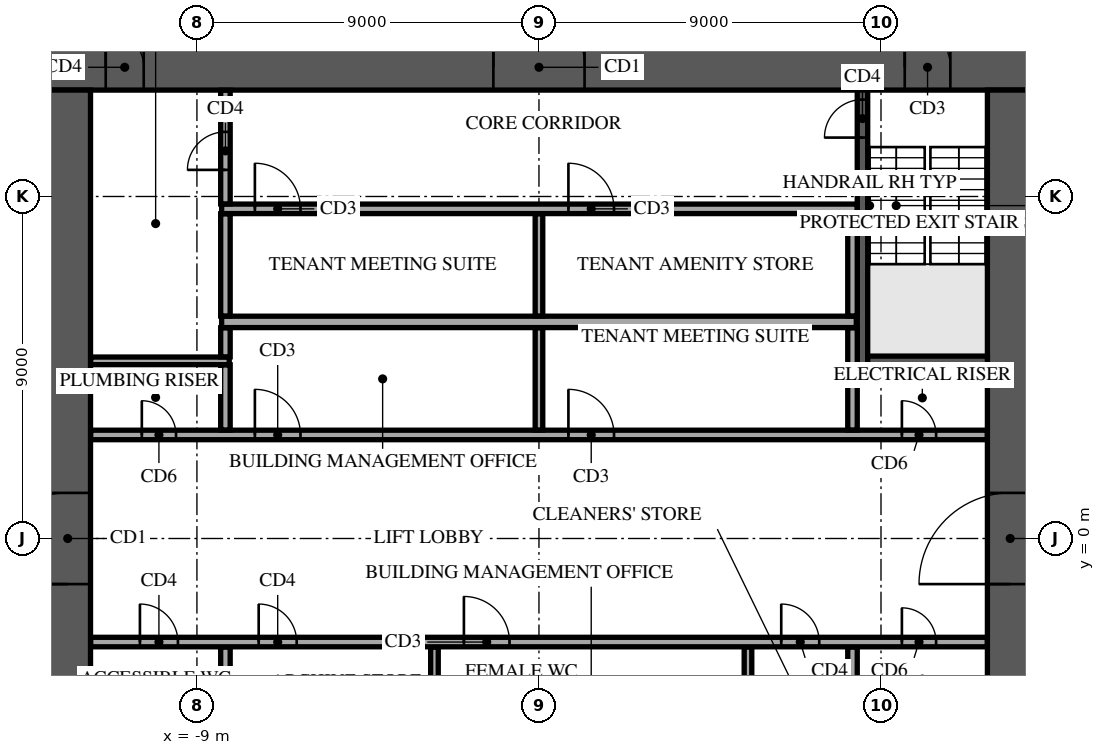
"""IFC4 building model, lengths in metres.
Left out: names, types, materials, properties, quantities, classifications, styles, units other than length and angle.
Written with IfcOpenShell. Run it as: python <this file> out.ifc"""

import sys

from ifc_helpers import new_model, si_unit, direction, frame, frame_2d, origin, place, context, subcontext, project, spatial, rectangle, extrude, element, fill, save


model = new_model("IFC4")
c1 = context("Model", 3, precision=1e-05, world=origin(), true_north=direction((0.0, 1.0)))
c2 = subcontext(c1, "Body", "Model", "MODEL_VIEW")
j1 = project(units=[si_unit("LENGTHUNIT", "METRE"), si_unit("PLANEANGLEUNIT", "RADIAN")], contexts=[c1])
p1 = place(None, origin())
s1 = spatial("IfcSite", under=j1, at=p1, CompositionType="ELEMENT")
p2 = place(p1, origin())
s2 = spatial("IfcBuilding", under=s1, at=p2, CompositionType="ELEMENT")
p3 = place(p2, frame((0.0, 0.0, -9.0)))
s3 = spatial("IfcBuildingStorey", under=s2, at=p3, CompositionType="ELEMENT", Elevation=-9.0)
p4 = place(p3, frame((-13.0, 12.4, 0.0), z_axis=(0.0, 0.0, 1.0), x_axis=(1.0, 0.0, 0.0)))
e1 = element("IfcWall", 1, at=p4, inside=s3, PredefinedType="SHEAR", context=c2, shape_type="SweptSolid", body=[
    extrude(rectangle(XDim=26.0, YDim=1.2, at=frame_2d((13.0, 0.0))), origin(), (0.0, 0.0, 1.0), 4.2),
])
p5 = place(p4, frame((11.8, 0.0, 0.0)))
e2 = element("IfcOpeningElement", 2, at=p5, cuts=e1, PredefinedType="OPENING", context=c2, shape_type="SweptSolid", body=[
    extrude(rectangle(XDim=2.4, YDim=2.4, at=frame_2d((1.2, 1.2))), frame((0.0, 0.61, 0.0), z_axis=(0.0, -1.0, 0.0), x_axis=(1.0, 0.0, 0.0)), (0.0, 0.0, 1.0), 1.22),
])
p6 = place(p4, frame((22.625, 0.0, 0.0)))
e3 = element("IfcOpeningElement", 3, at=p6, cuts=e1, PredefinedType="OPENING", context=c2, shape_type="SweptSolid", body=[
    extrude(rectangle(XDim=1.2, YDim=2.1, at=frame_2d((0.6, 1.05))), frame((0.0, 0.61, 0.0), z_axis=(0.0, -1.0, 0.0), x_axis=(1.0, 0.0, 0.0)), (0.0, 0.0, 1.0), 1.22),
])
p7 = place(p4, frame((1.6, 0.0, 0.0)))
e4 = element("IfcOpeningElement", 4, at=p7, cuts=e1, PredefinedType="OPENING", context=c2, shape_type="SweptSolid", body=[
    extrude(rectangle(XDim=1.0, YDim=2.1, at=frame_2d((0.5, 1.05))), frame((0.0, 0.61, 0.0), z_axis=(0.0, -1.0, 0.0), x_axis=(1.0, 0.0, 0.0)), (0.0, 0.0, 1.0), 1.22),
])
p8 = place(p3, frame((12.4, -11.8, 0.0), z_axis=(0.0, 0.0, 1.0), x_axis=(0.0, 1.0, 0.0)))
e5 = element("IfcWall", 5, at=p8, inside=s3, PredefinedType="SHEAR", context=c2, shape_type="SweptSolid", body=[
    extrude(rectangle(XDim=23.6, YDim=1.2, at=frame_2d((11.8, 0.0))), origin(), (0.0, 0.0, 1.0), 4.2),
])
p9 = place(p8, frame((10.6, 0.0, 0.0)))
e6 = element("IfcOpeningElement", 6, at=p9, cuts=e5, PredefinedType="OPENING", context=c2, shape_type="SweptSolid", body=[
    extrude(rectangle(XDim=2.4, YDim=2.4, at=frame_2d((1.2, 1.2))), frame((0.0, 0.61, 0.0), z_axis=(0.0, -1.0, 0.0), x_axis=(1.0, 0.0, 0.0)), (0.0, 0.0, 1.0), 1.22),
])
p10 = place(p3, frame((-12.4, -11.8, 0.0), z_axis=(0.0, 0.0, 1.0), x_axis=(0.0, 1.0, 0.0)))
e7 = element("IfcWall", 7, at=p10, inside=s3, PredefinedType="SHEAR", context=c2, shape_type="SweptSolid", body=[
    extrude(rectangle(XDim=23.6, YDim=1.2, at=frame_2d((11.8, 0.0))), origin(), (0.0, 0.0, 1.0), 4.2),
])
p11 = place(p10, frame((10.6, 0.0, 0.0)))
e8 = element("IfcOpeningElement", 8, at=p11, cuts=e7, PredefinedType="OPENING", context=c2, shape_type="SweptSolid", body=[
    extrude(rectangle(XDim=2.4, YDim=2.4, at=frame_2d((1.2, 1.2))), frame((0.0, 0.61, 0.0), z_axis=(0.0, -1.0, 0.0), x_axis=(1.0, 0.0, 0.0)), (0.0, 0.0, 1.0), 1.22),
])
p12 = place(p3, frame((8.512, 4.55, 0.0), z_axis=(0.0, 0.0, 1.0), x_axis=(0.0, 1.0, 0.0)))
e9 = element("IfcWall", 9, at=p12, inside=s3, PredefinedType="SOLIDWALL", context=c2, shape_type="SweptSolid", body=[
    extrude(rectangle(XDim=7.25, YDim=0.275, at=frame_2d((3.625, 0.0))), origin(), (0.0, 0.0, 1.0), 4.2),
])
p13 = place(p12, frame((6.0, 0.0, 0.0)))
e10 = element("IfcOpeningElement", 10, at=p13, cuts=e9, PredefinedType="OPENING", context=c2, shape_type="SweptSolid", body=[
    extrude(rectangle(XDim=1.0, YDim=2.1, at=frame_2d((0.5, 1.05))), frame((0.0, 0.147, 0.0), z_axis=(0.0, -1.0, 0.0), x_axis=(1.0, 0.0, 0.0)), (0.0, 0.0, 1.0), 0.295),
])
p14 = place(p3, frame((8.65, 4.675, 0.0), z_axis=(0.0, 0.0, 1.0), x_axis=(1.0, 0.0, 0.0)))
e11 = element("IfcWall", 11, at=p14, inside=s3, PredefinedType="SOLIDWALL", context=c2, shape_type="SweptSolid", body=[
    extrude(rectangle(XDim=3.15, YDim=0.25, at=frame_2d((1.575, 0.0))), origin(), (0.0, 0.0, 1.0), 4.2),
])
p15 = place(p3, frame((-8.25, -5.545, 0.0), z_axis=(0.0, 0.0, 1.0), x_axis=(0.0, 1.0, 0.0)))
e12 = element("IfcWall", 12, at=p15, inside=s3, PredefinedType="PARTITIONING", context=c2, shape_type="SweptSolid", body=[
    extrude(rectangle(XDim=2.69, YDim=0.25, at=frame_2d((1.345, 0.0))), origin(), (0.0, 0.0, 1.0), 4.2),
])
for number, where, z_axis, x_axis in (
    (13, (-2.75, -5.545, 0.0), (0.0, 0.0, 1.0), (0.0, 1.0, 0.0)),
    (14, (5.5, -5.545, 0.0), (0.0, 0.0, 1.0), (0.0, 1.0, 0.0)),
):
    element("IfcWall", number, at=place(p3, frame(where, z_axis=z_axis, x_axis=x_axis)), inside=s3, PredefinedType="PARTITIONING", context=c2, shape_type="SweptSolid", body=[
        extrude(rectangle(XDim=2.69, YDim=0.2, at=frame_2d((1.345, 0.0))), origin(), (0.0, 0.0, 1.0), 4.2),
    ])
p16 = place(p3, frame((8.25, -5.545, 0.0), z_axis=(0.0, 0.0, 1.0), x_axis=(0.0, 1.0, 0.0)))
e15 = element("IfcWall", 15, at=p16, inside=s3, PredefinedType="PARTITIONING", context=c2, shape_type="SweptSolid", body=[
    extrude(rectangle(XDim=2.69, YDim=0.25, at=frame_2d((1.345, 0.0))), origin(), (0.0, 0.0, 1.0), 4.2),
])
p17 = place(p3, frame((-11.795, -2.725, 0.0), z_axis=(0.0, 0.0, 1.0), x_axis=(1.0, 0.0, 0.0)))
e16 = element("IfcWall", 16, at=p17, inside=s3, PredefinedType="PARTITIONING", context=c2, shape_type="SweptSolid", body=[
    extrude(rectangle(XDim=23.59, YDim=0.25, at=frame_2d((11.795, 0.0))), origin(), (0.0, 0.0, 1.0), 4.2),
])
p18 = place(p17, frame((1.295, 0.0, 0.0)))
e17 = element("IfcOpeningElement", 17, at=p18, cuts=e16, PredefinedType="OPENING", context=c2, shape_type="SweptSolid", body=[
    extrude(rectangle(XDim=1.0, YDim=2.1, at=frame_2d((0.5, 1.05))), frame((0.0, 0.135, 0.0), z_axis=(0.0, -1.0, 0.0), x_axis=(1.0, 0.0, 0.0)), (0.0, 0.0, 1.0), 0.27),
])
p19 = place(p17, frame((18.17, 0.0, 0.0)))
e18 = element("IfcOpeningElement", 18, at=p19, cuts=e16, PredefinedType="OPENING", context=c2, shape_type="SweptSolid", body=[
    extrude(rectangle(XDim=1.0, YDim=2.1, at=frame_2d((0.5, 1.05))), frame((0.0, 0.135, 0.0), z_axis=(0.0, -1.0, 0.0), x_axis=(1.0, 0.0, 0.0)), (0.0, 0.0, 1.0), 0.27),
])
p20 = place(p17, frame((21.345, 0.0, 0.0)))
e19 = element("IfcOpeningElement", 19, at=p20, cuts=e16, PredefinedType="OPENING", context=c2, shape_type="SweptSolid", body=[
    extrude(rectangle(XDim=0.9, YDim=2.1, at=frame_2d((0.45, 1.05))), frame((0.0, 0.135, 0.0), z_axis=(0.0, -1.0, 0.0), x_axis=(1.0, 0.0, 0.0)), (0.0, 0.0, 1.0), 0.27),
])
p21 = place(p17, frame((4.42, 0.0, 0.0)))
e20 = element("IfcOpeningElement", 20, at=p21, cuts=e16, PredefinedType="OPENING", context=c2, shape_type="SweptSolid", body=[
    extrude(rectangle(XDim=1.0, YDim=2.1, at=frame_2d((0.5, 1.05))), frame((0.0, 0.135, 0.0), z_axis=(0.0, -1.0, 0.0), x_axis=(1.0, 0.0, 0.0)), (0.0, 0.0, 1.0), 0.27),
])
p22 = place(p17, frame((9.82, 0.0, 0.0)))
e21 = element("IfcOpeningElement", 21, at=p22, cuts=e16, PredefinedType="OPENING", context=c2, shape_type="SweptSolid", body=[
    extrude(rectangle(XDim=1.2, YDim=2.1, at=frame_2d((0.6, 1.05))), frame((0.0, 0.135, 0.0), z_axis=(0.0, -1.0, 0.0), x_axis=(1.0, 0.0, 0.0)), (0.0, 0.0, 1.0), 0.27),
])
p23 = place(p3, frame((-11.795, 2.725, 0.0), z_axis=(0.0, 0.0, 1.0), x_axis=(1.0, 0.0, 0.0)))
e22 = element("IfcWall", 22, at=p23, inside=s3, PredefinedType="PARTITIONING", context=c2, shape_type="SweptSolid", body=[
    extrude(rectangle(XDim=23.59, YDim=0.25, at=frame_2d((11.795, 0.0))), origin(), (0.0, 0.0, 1.0), 4.2),
])
p24 = place(p23, frame((21.345, 0.0, 0.0)))
e23 = element("IfcOpeningElement", 23, at=p24, cuts=e22, PredefinedType="OPENING", context=c2, shape_type="SweptSolid", body=[
    extrude(rectangle(XDim=0.9, YDim=2.1, at=frame_2d((0.45, 1.05))), frame((0.0, 0.135, 0.0), z_axis=(0.0, -1.0, 0.0), x_axis=(1.0, 0.0, 0.0)), (0.0, 0.0, 1.0), 0.27),
])
p25 = place(p23, frame((1.345, 0.0, 0.0)))
e24 = element("IfcOpeningElement", 24, at=p25, cuts=e22, PredefinedType="OPENING", context=c2, shape_type="SweptSolid", body=[
    extrude(rectangle(XDim=0.9, YDim=2.1, at=frame_2d((0.45, 1.05))), frame((0.0, 0.135, 0.0), z_axis=(0.0, -1.0, 0.0), x_axis=(1.0, 0.0, 0.0)), (0.0, 0.0, 1.0), 0.27),
])
p26 = place(p23, frame((4.32, 0.0, 0.0)))
e25 = element("IfcOpeningElement", 25, at=p26, cuts=e22, PredefinedType="OPENING", context=c2, shape_type="SweptSolid", body=[
    extrude(rectangle(XDim=1.2, YDim=2.1, at=frame_2d((0.6, 1.05))), frame((0.0, 0.135, 0.0), z_axis=(0.0, -1.0, 0.0), x_axis=(1.0, 0.0, 0.0)), (0.0, 0.0, 1.0), 0.27),
])
p27 = place(p23, frame((12.57, 0.0, 0.0)))
e26 = element("IfcOpeningElement", 26, at=p27, cuts=e22, PredefinedType="OPENING", context=c2, shape_type="SweptSolid", body=[
    extrude(rectangle(XDim=1.2, YDim=2.1, at=frame_2d((0.6, 1.05))), frame((0.0, 0.135, 0.0), z_axis=(0.0, -1.0, 0.0), x_axis=(1.0, 0.0, 0.0)), (0.0, 0.0, 1.0), 0.27),
])
p28 = place(p3, frame((-8.25, 2.855, 0.0), z_axis=(0.0, 0.0, 1.0), x_axis=(0.0, 1.0, 0.0)))
e27 = element("IfcWall", 27, at=p28, inside=s3, PredefinedType="PARTITIONING", context=c2, shape_type="SweptSolid", body=[
    extrude(rectangle(XDim=1.715, YDim=0.25, at=frame_2d((0.857, 0.0))), origin(), (0.0, 0.0, 1.0), 4.2),
])
p29 = place(p3, frame((0.0, 2.855, 0.0), z_axis=(0.0, 0.0, 1.0), x_axis=(0.0, 1.0, 0.0)))
e28 = element("IfcWall", 28, at=p29, inside=s3, PredefinedType="PARTITIONING", context=c2, shape_type="SweptSolid", body=[
    extrude(rectangle(XDim=2.69, YDim=0.2, at=frame_2d((1.345, 0.0))), origin(), (0.0, 0.0, 1.0), 4.2),
])
p30 = place(p3, frame((8.25, 2.855, 0.0), z_axis=(0.0, 0.0, 1.0), x_axis=(0.0, 1.0, 0.0)))
e29 = element("IfcWall", 29, at=p30, inside=s3, PredefinedType="PARTITIONING", context=c2, shape_type="SweptSolid", body=[
    extrude(rectangle(XDim=2.69, YDim=0.25, at=frame_2d((1.345, 0.0))), origin(), (0.0, 0.0, 1.0), 4.2),
])
p31 = place(p3, frame((-11.795, 4.675, 0.0), z_axis=(0.0, 0.0, 1.0), x_axis=(1.0, 0.0, 0.0)))
e30 = element("IfcWall", 30, at=p31, inside=s3, PredefinedType="PARTITIONING", context=c2, shape_type="SweptSolid", body=[
    extrude(rectangle(XDim=3.645, YDim=0.2, at=frame_2d((1.823, 0.0))), origin(), (0.0, 0.0, 1.0), 4.2),
])
p32 = place(p3, frame((-8.25, 4.78, 0.0), z_axis=(0.0, 0.0, 1.0), x_axis=(0.0, 1.0, 0.0)))
e31 = element("IfcWall", 31, at=p32, inside=s3, PredefinedType="PARTITIONING", context=c2, shape_type="SweptSolid", body=[
    extrude(rectangle(XDim=0.765, YDim=0.25, at=frame_2d((0.382, 0.0))), origin(), (0.0, 0.0, 1.0), 4.2),
])
p33 = place(p3, frame((-8.35, 5.7, 0.0), z_axis=(0.0, 0.0, 1.0), x_axis=(1.0, 0.0, 0.0)))
e32 = element("IfcWall", 32, at=p33, inside=s3, PredefinedType="PARTITIONING", context=c2, shape_type="SweptSolid", body=[
    extrude(rectangle(XDim=16.7, YDim=0.3, at=frame_2d((8.35, 0.0))), origin(), (0.0, 0.0, 1.0), 4.2),
])
p34 = place(p3, frame((-8.25, 5.855, 0.0), z_axis=(0.0, 0.0, 1.0), x_axis=(0.0, 1.0, 0.0)))
e33 = element("IfcWall", 33, at=p34, inside=s3, PredefinedType="PARTITIONING", context=c2, shape_type="SweptSolid", body=[
    extrude(rectangle(XDim=2.69, YDim=0.25, at=frame_2d((1.345, 0.0))), origin(), (0.0, 0.0, 1.0), 4.2),
])
p35 = place(p3, frame((0.0, 5.855, 0.0), z_axis=(0.0, 0.0, 1.0), x_axis=(0.0, 1.0, 0.0)))
e34 = element("IfcWall", 34, at=p35, inside=s3, PredefinedType="PARTITIONING", context=c2, shape_type="SweptSolid", body=[
    extrude(rectangle(XDim=2.69, YDim=0.2, at=frame_2d((1.345, 0.0))), origin(), (0.0, 0.0, 1.0), 4.2),
])
p36 = place(p3, frame((8.25, 5.855, 0.0), z_axis=(0.0, 0.0, 1.0), x_axis=(0.0, 1.0, 0.0)))
e35 = element("IfcWall", 35, at=p36, inside=s3, PredefinedType="PARTITIONING", context=c2, shape_type="SweptSolid", body=[
    extrude(rectangle(XDim=2.69, YDim=0.25, at=frame_2d((1.345, 0.0))), origin(), (0.0, 0.0, 1.0), 4.2),
])
p37 = place(p3, frame((-8.35, 8.675, 0.0), z_axis=(0.0, 0.0, 1.0), x_axis=(1.0, 0.0, 0.0)))
e36 = element("IfcWall", 36, at=p37, inside=s3, PredefinedType="PARTITIONING", context=c2, shape_type="SweptSolid", body=[
    extrude(rectangle(XDim=16.72, YDim=0.25, at=frame_2d((8.36, 0.0))), origin(), (0.0, 0.0, 1.0), 4.2),
])
p38 = place(p37, frame((0.875, 0.0, 0.0)))
e37 = element("IfcOpeningElement", 37, at=p38, cuts=e36, PredefinedType="OPENING", context=c2, shape_type="SweptSolid", body=[
    extrude(rectangle(XDim=1.2, YDim=2.1, at=frame_2d((0.6, 1.05))), frame((0.0, 0.135, 0.0), z_axis=(0.0, -1.0, 0.0), x_axis=(1.0, 0.0, 0.0)), (0.0, 0.0, 1.0), 0.27),
])
p39 = place(p37, frame((9.125, 0.0, 0.0)))
e38 = element("IfcOpeningElement", 38, at=p39, cuts=e36, PredefinedType="OPENING", context=c2, shape_type="SweptSolid", body=[
    extrude(rectangle(XDim=1.2, YDim=2.1, at=frame_2d((0.6, 1.05))), frame((0.0, 0.135, 0.0), z_axis=(0.0, -1.0, 0.0), x_axis=(1.0, 0.0, 0.0)), (0.0, 0.0, 1.0), 0.27),
])
p40 = place(p3, frame((-8.25, 8.805, 0.0), z_axis=(0.0, 0.0, 1.0), x_axis=(0.0, 1.0, 0.0)))
e39 = element("IfcWall", 39, at=p40, inside=s3, PredefinedType="PARTITIONING", context=c2, shape_type="SweptSolid", body=[
    extrude(rectangle(XDim=2.99, YDim=0.25, at=frame_2d((1.495, 0.0))), origin(), (0.0, 0.0, 1.0), 4.2),
])
p41 = place(p40, frame((0.895, 0.0, 0.0)))
e40 = element("IfcOpeningElement", 40, at=p41, cuts=e39, PredefinedType="OPENING", context=c2, shape_type="SweptSolid", body=[
    extrude(rectangle(XDim=1.0, YDim=2.1, at=frame_2d((0.5, 1.05))), frame((0.0, 0.135, 0.0), z_axis=(0.0, -1.0, 0.0), x_axis=(1.0, 0.0, 0.0)), (0.0, 0.0, 1.0), 0.27),
])
p42 = place(p5, origin())
e41 = element("IfcDoor", 41, at=p42, inside=s3, OperationType="SINGLE_SWING_LEFT", PredefinedType="DOOR", context=c2, shape_type="SweptSolid", body=[
    extrude(rectangle(XDim=2.4, YDim=2.4, at=frame_2d((1.2, 1.2))), frame((0.0, 0.025, 0.0), z_axis=(0.0, -1.0, 0.0), x_axis=(1.0, 0.0, 0.0)), (0.0, 0.0, 1.0), 0.05),
])
fill(e2, e41)
p43 = place(p6, origin())
e42 = element("IfcDoor", 42, at=p43, inside=s3, OperationType="SINGLE_SWING_LEFT", PredefinedType="DOOR", context=c2, shape_type="SweptSolid", body=[
    extrude(rectangle(XDim=1.2, YDim=2.1, at=frame_2d((0.6, 1.05))), frame((0.0, 0.025, 0.0), z_axis=(0.0, -1.0, 0.0), x_axis=(1.0, 0.0, 0.0)), (0.0, 0.0, 1.0), 0.05),
])
fill(e3, e42)
p44 = place(p7, origin())
e43 = element("IfcDoor", 43, at=p44, inside=s3, OperationType="SINGLE_SWING_LEFT", PredefinedType="DOOR", context=c2, shape_type="SweptSolid", body=[
    extrude(rectangle(XDim=1.0, YDim=2.1, at=frame_2d((0.5, 1.05))), frame((0.0, 0.025, 0.0), z_axis=(0.0, -1.0, 0.0), x_axis=(1.0, 0.0, 0.0)), (0.0, 0.0, 1.0), 0.05),
])
fill(e4, e43)
p45 = place(p9, origin())
e44 = element("IfcDoor", 44, at=p45, inside=s3, OperationType="SINGLE_SWING_LEFT", PredefinedType="DOOR", context=c2, shape_type="SweptSolid", body=[
    extrude(rectangle(XDim=2.4, YDim=2.4, at=frame_2d((1.2, 1.2))), frame((0.0, 0.025, 0.0), z_axis=(0.0, -1.0, 0.0), x_axis=(1.0, 0.0, 0.0)), (0.0, 0.0, 1.0), 0.05),
])
fill(e6, e44)
p46 = place(p11, origin())
e45 = element("IfcDoor", 45, at=p46, inside=s3, OperationType="SINGLE_SWING_LEFT", PredefinedType="DOOR", context=c2, shape_type="SweptSolid", body=[
    extrude(rectangle(XDim=2.4, YDim=2.4, at=frame_2d((1.2, 1.2))), frame((0.0, 0.025, 0.0), z_axis=(0.0, -1.0, 0.0), x_axis=(1.0, 0.0, 0.0)), (0.0, 0.0, 1.0), 0.05),
])
fill(e8, e45)
p47 = place(p13, origin())
e46 = element("IfcDoor", 46, at=p47, inside=s3, OperationType="SINGLE_SWING_LEFT", PredefinedType="DOOR", context=c2, shape_type="SweptSolid", body=[
    extrude(rectangle(XDim=1.0, YDim=2.1, at=frame_2d((0.5, 1.05))), frame((0.0, 0.025, 0.0), z_axis=(0.0, -1.0, 0.0), x_axis=(1.0, 0.0, 0.0)), (0.0, 0.0, 1.0), 0.05),
])
fill(e10, e46)
p48 = place(p18, origin())
e47 = element("IfcDoor", 47, at=p48, inside=s3, OperationType="SINGLE_SWING_LEFT", PredefinedType="DOOR", context=c2, shape_type="SweptSolid", body=[
    extrude(rectangle(XDim=1.0, YDim=2.1, at=frame_2d((0.5, 1.05))), frame((0.0, 0.025, 0.0), z_axis=(0.0, -1.0, 0.0), x_axis=(1.0, 0.0, 0.0)), (0.0, 0.0, 1.0), 0.05),
])
fill(e17, e47)
p49 = place(p19, origin())
e48 = element("IfcDoor", 48, at=p49, inside=s3, OperationType="SINGLE_SWING_LEFT", PredefinedType="DOOR", context=c2, shape_type="SweptSolid", body=[
    extrude(rectangle(XDim=1.0, YDim=2.1, at=frame_2d((0.5, 1.05))), frame((0.0, 0.025, 0.0), z_axis=(0.0, -1.0, 0.0), x_axis=(1.0, 0.0, 0.0)), (0.0, 0.0, 1.0), 0.05),
])
fill(e18, e48)
p50 = place(p24, origin())
e49 = element("IfcDoor", 49, at=p50, inside=s3, OperationType="SINGLE_SWING_LEFT", PredefinedType="DOOR", context=c2, shape_type="SweptSolid", body=[
    extrude(rectangle(XDim=0.9, YDim=2.1, at=frame_2d((0.45, 1.05))), frame((0.0, 0.025, 0.0), z_axis=(0.0, -1.0, 0.0), x_axis=(1.0, 0.0, 0.0)), (0.0, 0.0, 1.0), 0.05),
])
fill(e23, e49)
p51 = place(p20, origin())
e50 = element("IfcDoor", 50, at=p51, inside=s3, OperationType="SINGLE_SWING_LEFT", PredefinedType="DOOR", context=c2, shape_type="SweptSolid", body=[
    extrude(rectangle(XDim=0.9, YDim=2.1, at=frame_2d((0.45, 1.05))), frame((0.0, 0.025, 0.0), z_axis=(0.0, -1.0, 0.0), x_axis=(1.0, 0.0, 0.0)), (0.0, 0.0, 1.0), 0.05),
])
fill(e19, e50)
p52 = place(p25, origin())
e51 = element("IfcDoor", 51, at=p52, inside=s3, OperationType="SINGLE_SWING_LEFT", PredefinedType="DOOR", context=c2, shape_type="SweptSolid", body=[
    extrude(rectangle(XDim=0.9, YDim=2.1, at=frame_2d((0.45, 1.05))), frame((0.0, 0.025, 0.0), z_axis=(0.0, -1.0, 0.0), x_axis=(1.0, 0.0, 0.0)), (0.0, 0.0, 1.0), 0.05),
])
fill(e24, e51)
p53 = place(p41, origin())
e52 = element("IfcDoor", 52, at=p53, inside=s3, OperationType="SINGLE_SWING_LEFT", PredefinedType="DOOR", context=c2, shape_type="SweptSolid", body=[
    extrude(rectangle(XDim=1.0, YDim=2.1, at=frame_2d((0.5, 1.05))), frame((0.0, 0.025, 0.0), z_axis=(0.0, -1.0, 0.0), x_axis=(1.0, 0.0, 0.0)), (0.0, 0.0, 1.0), 0.05),
])
fill(e40, e52)
p54 = place(p26, origin())
e53 = element("IfcDoor", 53, at=p54, inside=s3, OperationType="SINGLE_SWING_LEFT", PredefinedType="DOOR", context=c2, shape_type="SweptSolid", body=[
    extrude(rectangle(XDim=1.2, YDim=2.1, at=frame_2d((0.6, 1.05))), frame((0.0, 0.025, 0.0), z_axis=(0.0, -1.0, 0.0), x_axis=(1.0, 0.0, 0.0)), (0.0, 0.0, 1.0), 0.05),
])
fill(e25, e53)
p55 = place(p27, origin())
e54 = element("IfcDoor", 54, at=p55, inside=s3, OperationType="SINGLE_SWING_LEFT", PredefinedType="DOOR", context=c2, shape_type="SweptSolid", body=[
    extrude(rectangle(XDim=1.2, YDim=2.1, at=frame_2d((0.6, 1.05))), frame((0.0, 0.025, 0.0), z_axis=(0.0, -1.0, 0.0), x_axis=(1.0, 0.0, 0.0)), (0.0, 0.0, 1.0), 0.05),
])
fill(e26, e54)
p56 = place(p38, origin())
e55 = element("IfcDoor", 55, at=p56, inside=s3, OperationType="SINGLE_SWING_LEFT", PredefinedType="DOOR", context=c2, shape_type="SweptSolid", body=[
    extrude(rectangle(XDim=1.2, YDim=2.1, at=frame_2d((0.6, 1.05))), frame((0.0, 0.025, 0.0), z_axis=(0.0, -1.0, 0.0), x_axis=(1.0, 0.0, 0.0)), (0.0, 0.0, 1.0), 0.05),
])
fill(e37, e55)
p57 = place(p39, origin())
e56 = element("IfcDoor", 56, at=p57, inside=s3, OperationType="SINGLE_SWING_LEFT", PredefinedType="DOOR", context=c2, shape_type="SweptSolid", body=[
    extrude(rectangle(XDim=1.2, YDim=2.1, at=frame_2d((0.6, 1.05))), frame((0.0, 0.025, 0.0), z_axis=(0.0, -1.0, 0.0), x_axis=(1.0, 0.0, 0.0)), (0.0, 0.0, 1.0), 0.05),
])
fill(e38, e56)
p58 = place(p21, origin())
e57 = element("IfcDoor", 57, at=p58, inside=s3, OperationType="SINGLE_SWING_LEFT", PredefinedType="DOOR", context=c2, shape_type="SweptSolid", body=[
    extrude(rectangle(XDim=1.0, YDim=2.1, at=frame_2d((0.5, 1.05))), frame((0.0, 0.025, 0.0), z_axis=(0.0, -1.0, 0.0), x_axis=(1.0, 0.0, 0.0)), (0.0, 0.0, 1.0), 0.05),
])
fill(e20, e57)
p59 = place(p22, origin())
e58 = element("IfcDoor", 58, at=p59, inside=s3, OperationType="SINGLE_SWING_LEFT", PredefinedType="DOOR", context=c2, shape_type="SweptSolid", body=[
    extrude(rectangle(XDim=1.2, YDim=2.1, at=frame_2d((0.6, 1.05))), frame((0.0, 0.025, 0.0), z_axis=(0.0, -1.0, 0.0), x_axis=(1.0, 0.0, 0.0)), (0.0, 0.0, 1.0), 0.05),
])
fill(e21, e58)
save(model, sys.argv[1])
